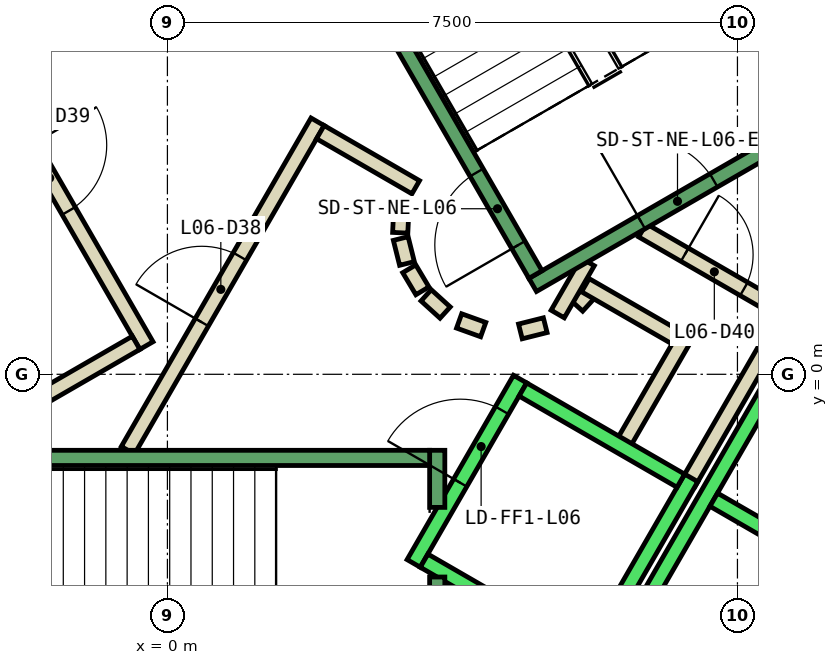
"""IFC4 building model, lengths in metres.
Left out: names, types, materials, properties, quantities, classifications, styles, units other than length and angle.
Written with IfcOpenShell. Run it as: python <this file> out.ifc"""

import sys

from ifc_helpers import new_model, si_unit, direction, frame, frame_2d, origin, place, context, subcontext, project, spatial, polyline, rectangle, outline, extrude, element, fill, save


model = new_model("IFC4")
c1 = context("Model", 3, precision=1e-05, world=origin(), true_north=direction((0.0, 1.0)))
c2 = subcontext(c1, "Body", "Model", "MODEL_VIEW")
j1 = project(units=[si_unit("LENGTHUNIT", "METRE"), si_unit("PLANEANGLEUNIT", "RADIAN")], contexts=[c1])
p1 = place(None, origin())
s1 = spatial("IfcSite", under=j1, at=p1, CompositionType="ELEMENT")
p2 = place(p1, origin())
s2 = spatial("IfcBuilding", under=s1, at=p2, CompositionType="ELEMENT")
p3 = place(p2, frame((0.0, 0.0, 35.0)))
s3 = spatial("IfcBuildingStorey", under=s2, at=p3, CompositionType="ELEMENT", Elevation=35.0)
p4 = place(p3, frame((0.0, 0.0, -0.6)))
e1 = element("IfcWall", 1, at=p4, inside=s3, PredefinedType="SHEAR", context=c2, shape_type="SweptSolid", body=[
    extrude(outline(polyline([(8.517, 11.748), (7.651, 11.248), (12.702, 2.5), (13.856, 2.5), (8.517, 11.748)])), origin(), (0.0, 0.0, 1.0), 4.4),
])
p5 = place(p3, frame((5.39, 0.898, 0.0), z_axis=(0.0, 0.0, 1.0), x_axis=(0.673828488714, 0.738887791073, 0.0)))
e2 = element("IfcWall", 2, at=p5, inside=s3, PredefinedType="PARTITIONING", context=c2, shape_type="SweptSolid", body=[
    extrude(rectangle(XDim=0.263, YDim=0.2, at=frame_2d((0.131, 0.0))), origin(), (0.0, 0.0, 1.0), 3.8),
])
p6 = place(p3, frame((5.499, 1.172, 0.0), z_axis=(0.0, 0.0, 1.0), x_axis=(0.866333505267, -0.499465972466, 0.0)))
e3 = element("IfcWall", 3, at=p6, inside=s3, PredefinedType="PARTITIONING", context=c2, shape_type="SweptSolid", body=[
    extrude(rectangle(XDim=1.374, YDim=0.2, at=frame_2d((0.687, 0.0))), origin(), (0.0, 0.0, 1.0), 3.8),
])
p7 = place(p3, frame((6.826, 0.522, 0.0), z_axis=(0.0, 0.0, 1.0), x_axis=(-0.500016722714, -0.866015748706, 0.0)))
e4 = element("IfcWall", 4, at=p7, inside=s3, PredefinedType="PARTITIONING", context=c2, shape_type="SweptSolid", body=[
    extrude(rectangle(XDim=1.7, YDim=0.2, at=frame_2d((0.85, 0.0))), origin(), (0.0, 0.0, 1.0), 3.8),
])
p8 = place(p3, frame((6.25, 1.894, 0.0), z_axis=(0.0, 0.0, 1.0), x_axis=(0.866043184279, -0.499969202016, 0.0)))
e5 = element("IfcWall", 5, at=p8, inside=s3, PredefinedType="PARTITIONING", context=c2, shape_type="SweptSolid", body=[
    extrude(rectangle(XDim=2.084, YDim=0.2, at=frame_2d((1.042, 0.0))), origin(), (0.0, 0.0, 1.0), 3.8),
])
p9 = place(p8, frame((0.642, 0.0, 0.0)))
e6 = element("IfcOpeningElement", 6, at=p9, cuts=e5, PredefinedType="OPENING", context=c2, shape_type="SweptSolid", body=[
    extrude(rectangle(XDim=0.9, YDim=2.1, at=frame_2d((0.45, 1.05))), frame((0.0, 0.11, 0.0), z_axis=(0.0, -1.0, 0.0), x_axis=(1.0, 0.0, 0.0)), (0.0, 0.0, 1.0), 0.22),
])
p10 = place(p3, frame((8.192, 0.888, 0.0), z_axis=(0.0, 0.0, 1.0), x_axis=(-0.499940625693, -0.866059680843, 0.0)))
e7 = element("IfcWall", 7, at=p10, inside=s3, PredefinedType="PARTITIONING", context=c2, shape_type="SweptSolid", body=[
    extrude(rectangle(XDim=2.68, YDim=0.2, at=frame_2d((1.34, 0.0))), origin(), (0.0, 0.0, 1.0), 3.8),
])
p11 = place(p3, frame((5.135, 0.793, 0.0), z_axis=(0.0, 0.0, 1.0), x_axis=(0.499526442893, 0.866298639529, 0.0)))
e8 = element("IfcWall", 8, at=p11, inside=s3, PredefinedType="PARTITIONING", context=c2, shape_type="SweptSolid", body=[
    extrude(rectangle(XDim=0.791, YDim=0.2, at=frame_2d((0.396, 0.0))), origin(), (0.0, 0.0, 1.0), 3.8),
])
p12 = place(p3, frame((-0.52, -1.0, 0.0), z_axis=(0.0, 0.0, 1.0), x_axis=(0.50011622646, 0.865958290007, 0.0)))
e9 = element("IfcWall", 9, at=p12, inside=s3, PredefinedType="PARTITIONING", context=c2, shape_type="SweptSolid", body=[
    extrude(rectangle(XDim=4.991, YDim=0.2, at=frame_2d((2.496, 0.0))), origin(), (0.0, 0.0, 1.0), 3.8),
])
p13 = place(p12, frame((1.945, 0.0, 0.0)))
e10 = element("IfcOpeningElement", 10, at=p13, cuts=e9, PredefinedType="OPENING", context=c2, shape_type="SweptSolid", body=[
    extrude(rectangle(XDim=1.0, YDim=2.1, at=frame_2d((0.5, 1.05))), frame((0.0, 0.11, 0.0), z_axis=(0.0, -1.0, 0.0), x_axis=(1.0, 0.0, 0.0)), (0.0, 0.0, 1.0), 0.22),
])
p14 = place(p3, frame((2.012, 3.186, 0.0), z_axis=(0.0, 0.0, 1.0), x_axis=(0.865891012941, -0.500232699559, 0.0)))
e11 = element("IfcWall", 11, at=p14, inside=s3, PredefinedType="PARTITIONING", context=c2, shape_type="SweptSolid", body=[
    extrude(rectangle(XDim=1.449, YDim=0.2, at=frame_2d((0.725, 0.0))), origin(), (0.0, 0.0, 1.0), 3.8),
])
p15 = place(p3, frame((3.079, 2.199, 0.0), z_axis=(0.0, 0.0, 1.0), x_axis=(-0.047771483479, -0.998858290933, 0.0)))
e12 = element("IfcWall", 12, at=p15, inside=s3, PredefinedType="PARTITIONING", context=c2, shape_type="SweptSolid", body=[
    extrude(rectangle(XDim=0.337, YDim=0.2, at=frame_2d((0.169, 0.0))), origin(), (0.0, 0.0, 1.0), 3.8),
])
p16 = place(p3, frame((3.07, 1.786, 0.0), z_axis=(0.0, 0.0, 1.0), x_axis=(0.242705583207, -0.970099994784, 0.0)))
e13 = element("IfcWall", 13, at=p16, inside=s3, PredefinedType="PARTITIONING", context=c2, shape_type="SweptSolid", body=[
    extrude(rectangle(XDim=0.338, YDim=0.2, at=frame_2d((0.169, 0.0))), origin(), (0.0, 0.0, 1.0), 3.8),
])
for number, where, z_axis, x_axis in (
    (14, (3.182, 1.388, 0.0), (0.0, 0.0, 1.0), (0.512, -0.859, 0.0)),
    (15, (3.404, 1.039, 0.0), (0.0, 0.0, 1.0), (0.74, -0.672, 0.0)),
):
    element("IfcWall", number, at=place(p3, frame(where, z_axis=z_axis, x_axis=x_axis)), inside=s3, PredefinedType="PARTITIONING", context=c2, shape_type="SweptSolid", body=[
        extrude(rectangle(XDim=0.338, YDim=0.2, at=frame_2d((0.169, 0.0))), origin(), (0.0, 0.0, 1.0), 3.8),
    ])
p17 = place(p3, frame((3.838, 0.702, 0.0), z_axis=(0.0, 0.0, 1.0), x_axis=(0.941035081519, -0.338308993895, 0.0)))
e16 = element("IfcWall", 16, at=p17, inside=s3, PredefinedType="PARTITIONING", context=c2, shape_type="SweptSolid", body=[
    extrude(rectangle(XDim=0.337, YDim=0.2, at=frame_2d((0.168, 0.0))), origin(), (0.0, 0.0, 1.0), 3.8),
])
p18 = place(p3, frame((4.644, 0.564, 0.0), z_axis=(0.0, 0.0, 1.0), x_axis=(0.969929076366, 0.243387729394, 0.0)))
e17 = element("IfcWall", 17, at=p18, inside=s3, PredefinedType="PARTITIONING", context=c2, shape_type="SweptSolid", body=[
    extrude(rectangle(XDim=0.337, YDim=0.2, at=frame_2d((0.168, 0.0))), origin(), (0.0, 0.0, 1.0), 3.8),
])
p19 = place(p3, frame((-2.771, 4.7, 0.0), z_axis=(0.0, 0.0, 1.0), x_axis=(0.499969479948, -0.866043023828, 0.0)))
e18 = element("IfcWall", 18, at=p19, inside=s3, PredefinedType="PARTITIONING", context=c2, shape_type="SweptSolid", body=[
    extrude(rectangle(XDim=4.99, YDim=0.2, at=frame_2d((2.495, 0.0))), origin(), (0.0, 0.0, 1.0), 3.8),
])
p20 = place(p19, frame((1.945, 0.0, 0.0)))
e19 = element("IfcOpeningElement", 19, at=p20, cuts=e18, PredefinedType="OPENING", context=c2, shape_type="SweptSolid", body=[
    extrude(rectangle(XDim=1.0, YDim=2.1, at=frame_2d((0.5, 1.05))), frame((0.0, 0.11, 0.0), z_axis=(0.0, -1.0, 0.0), x_axis=(1.0, 0.0, 0.0)), (0.0, 0.0, 1.0), 0.22),
])
p21 = place(p3, frame((-0.412, 0.414, 0.0), z_axis=(0.0, 0.0, 1.0), x_axis=(-0.866017369001, -0.500013916395, 0.0)))
e20 = element("IfcWall", 20, at=p21, inside=s3, PredefinedType="PARTITIONING", context=c2, shape_type="SweptSolid", body=[
    extrude(rectangle(XDim=1.45, YDim=0.2, at=frame_2d((0.725, 0.0))), origin(), (0.0, 0.0, 1.0), 3.8),
])
p22 = place(p3, frame((3.24, -2.488, 0.0), z_axis=(0.0, 0.0, 1.0), x_axis=(0.49994636267, 0.866056369097, 0.0)))
e21 = element("IfcWall", 21, at=p22, inside=s3, PredefinedType="STANDARD", context=c2, shape_type="SweptSolid", body=[
    extrude(rectangle(XDim=2.8, YDim=0.2, at=frame_2d((1.4, 0.0))), origin(), (0.0, 0.0, 1.0), 3.8),
])
p23 = place(p22, frame((1.225, 0.0, 0.0)))
e22 = element("IfcOpeningElement", 22, at=p23, cuts=e21, PredefinedType="OPENING", context=c2, shape_type="SweptSolid", body=[
    extrude(rectangle(XDim=1.1, YDim=2.1, at=frame_2d((0.55, 1.05))), frame((0.0, 0.11, 0.0), z_axis=(0.0, -1.0, 0.0), x_axis=(1.0, 0.0, 0.0)), (0.0, 0.0, 1.0), 0.22),
])
p24 = place(p3, frame((5.492, -3.788, 0.0), z_axis=(0.0, 0.0, 1.0), x_axis=(0.500011755427, 0.866018616679, 0.0)))
e23 = element("IfcWall", 23, at=p24, inside=s3, PredefinedType="STANDARD", context=c2, shape_type="SweptSolid", body=[
    extrude(rectangle(XDim=2.8, YDim=0.2, at=frame_2d((1.4, 0.0))), origin(), (0.0, 0.0, 1.0), 3.8),
])
p25 = place(p3, frame((3.377, -2.452, 0.0), z_axis=(0.0, 0.0, 1.0), x_axis=(0.865955154139, -0.50012165622, 0.0)))
e24 = element("IfcWall", 24, at=p25, inside=s3, PredefinedType="STANDARD", context=c2, shape_type="SweptSolid", body=[
    extrude(rectangle(XDim=2.4, YDim=0.2, at=frame_2d((1.2, 0.0))), origin(), (0.0, 0.0, 1.0), 3.8),
])
p26 = place(p3, frame((4.677, -0.2, 0.0), z_axis=(0.0, 0.0, 1.0), x_axis=(0.865973769406, -0.500089422704, 0.0)))
e25 = element("IfcWall", 25, at=p26, inside=s3, PredefinedType="STANDARD", context=c2, shape_type="SweptSolid", body=[
    extrude(rectangle(XDim=2.399, YDim=0.2, at=frame_2d((1.2, 0.0))), origin(), (0.0, 0.0, 1.0), 3.8),
])
p27 = place(p3, frame((4.451, -6.19, 0.0), z_axis=(0.0, 0.0, 1.0), x_axis=(0.50000090737, 0.866024879913, 0.0)))
e26 = element("IfcWall", 26, at=p27, inside=s3, PredefinedType="STANDARD", context=c2, shape_type="SweptSolid", body=[
    extrude(rectangle(XDim=10.6, YDim=0.2, at=frame_2d((5.3, 0.0))), origin(), (0.0, 0.0, 1.0), 3.8),
])
p28 = place(p3, frame((7.188, -1.65, 0.0), z_axis=(0.0, 0.0, 1.0), x_axis=(0.866022959057, -0.500004234368, 0.0)))
e27 = element("IfcWall", 27, at=p28, inside=s3, PredefinedType="STANDARD", context=c2, shape_type="SweptSolid", body=[
    extrude(rectangle(XDim=2.5, YDim=0.2, at=frame_2d((1.25, 0.0))), origin(), (0.0, 0.0, 1.0), 3.8),
])
p29 = place(p3, frame((3.55, -2.667, 0.0), z_axis=(0.0, 0.0, 1.0), x_axis=(0.0, -1.0, 0.0)))
e28 = element("IfcWall", 28, at=p29, inside=s3, PredefinedType="STANDARD", context=c2, shape_type="SweptSolid", body=[
    extrude(rectangle(XDim=2.733, YDim=0.2, at=frame_2d((1.366, 0.0))), origin(), (0.0, 0.0, 1.0), 3.8),
])
p30 = place(p3, frame((3.55, -1.0, 0.0), z_axis=(0.0, 0.0, 1.0), x_axis=(0.0, -1.0, 0.0)))
e29 = element("IfcWall", 29, at=p30, inside=s3, PredefinedType="STANDARD", context=c2, shape_type="SweptSolid", body=[
    extrude(rectangle(XDim=0.751, YDim=0.2, at=frame_2d((0.375, 0.0))), origin(), (0.0, 0.0, 1.0), 3.8),
])
p31 = place(p3, frame((-3.45, -1.1, 0.0), z_axis=(0.0, 0.0, 1.0), x_axis=(1.0, 0.0, 0.0)))
e30 = element("IfcWall", 30, at=p31, inside=s3, PredefinedType="STANDARD", context=c2, shape_type="SweptSolid", body=[
    extrude(rectangle(XDim=6.9, YDim=0.2, at=frame_2d((3.45, 0.0))), origin(), (0.0, 0.0, 1.0), 3.8),
])
p32 = place(p31, frame((0.45, 0.0, 0.0)))
e31 = element("IfcOpeningElement", 31, at=p32, cuts=e30, PredefinedType="OPENING", context=c2, shape_type="SweptSolid", body=[
    extrude(rectangle(XDim=1.1, YDim=2.2, at=frame_2d((0.55, 1.1))), frame((0.0, 0.11, 0.0), z_axis=(0.0, -1.0, 0.0), x_axis=(1.0, 0.0, 0.0)), (0.0, 0.0, 1.0), 0.22),
])
p33 = place(p3, frame((4.806, 1.176, 0.0), z_axis=(0.0, 0.0, 1.0), x_axis=(0.866059941101, 0.499940174841, 0.0)))
e32 = element("IfcWall", 32, at=p33, inside=s3, PredefinedType="STANDARD", context=c2, shape_type="SweptSolid", body=[
    extrude(rectangle(XDim=4.4, YDim=0.2, at=frame_2d((2.2, 0.0))), origin(), (0.0, 0.0, 1.0), 3.8),
])
p34 = place(p33, frame((1.65, 0.0, 0.0)))
e33 = element("IfcOpeningElement", 33, at=p34, cuts=e32, PredefinedType="OPENING", context=c2, shape_type="SweptSolid", body=[
    extrude(rectangle(XDim=1.1, YDim=2.2, at=frame_2d((0.55, 1.1))), frame((0.0, 0.11, 0.0), z_axis=(0.0, -1.0, 0.0), x_axis=(1.0, 0.0, 0.0)), (0.0, 0.0, 1.0), 0.22),
])
p35 = place(p3, frame((4.843, 1.312, 0.0), z_axis=(0.0, 0.0, 1.0), x_axis=(-0.499963383562, 0.866046543262, 0.0)))
e34 = element("IfcWall", 34, at=p35, inside=s3, PredefinedType="STANDARD", context=c2, shape_type="SweptSolid", body=[
    extrude(rectangle(XDim=6.9, YDim=0.2, at=frame_2d((3.45, 0.0))), origin(), (0.0, 0.0, 1.0), 3.8),
])
p36 = place(p35, frame((0.45, 0.0, 0.0)))
e35 = element("IfcOpeningElement", 35, at=p36, cuts=e34, PredefinedType="OPENING", context=c2, shape_type="SweptSolid", body=[
    extrude(rectangle(XDim=1.1, YDim=2.2, at=frame_2d((0.55, 1.1))), frame((0.0, 0.11, 0.0), z_axis=(0.0, -1.0, 0.0), x_axis=(1.0, 0.0, 0.0)), (0.0, 0.0, 1.0), 0.22),
])
p37 = place(p3, frame((8.48, 3.412, 0.0), z_axis=(0.0, 0.0, 1.0), x_axis=(-0.499978703459, 0.866037698999, 0.0)))
e36 = element("IfcWall", 36, at=p37, inside=s3, PredefinedType="STANDARD", context=c2, shape_type="SweptSolid", body=[
    extrude(rectangle(XDim=6.9, YDim=0.2, at=frame_2d((3.45, 0.0))), origin(), (0.0, 0.0, 1.0), 3.8),
])
p38 = place(p3, frame((-1.393, 7.288, 0.0), z_axis=(0.0, 0.0, 1.0), x_axis=(-0.499963383562, -0.866046543262, 0.0)))
e37 = element("IfcWall", 37, at=p38, inside=s3, PredefinedType="STANDARD", context=c2, shape_type="SweptSolid", body=[
    extrude(rectangle(XDim=6.9, YDim=0.2, at=frame_2d((3.45, 0.0))), origin(), (0.0, 0.0, 1.0), 3.8),
])
p39 = place(p38, frame((0.45, 0.0, 0.0)))
e38 = element("IfcOpeningElement", 38, at=p39, cuts=e37, PredefinedType="OPENING", context=c2, shape_type="SweptSolid", body=[
    extrude(rectangle(XDim=1.1, YDim=2.2, at=frame_2d((0.55, 1.1))), frame((0.0, 0.11, 0.0), z_axis=(0.0, -1.0, 0.0), x_axis=(1.0, 0.0, 0.0)), (0.0, 0.0, 1.0), 0.22),
])
p40 = place(p13, origin())
e39 = element("IfcDoor", 39, at=p40, inside=s3, OperationType="SINGLE_SWING_LEFT", PredefinedType="DOOR", context=c2, shape_type="SweptSolid", body=[
    extrude(rectangle(XDim=1.0, YDim=2.1, at=frame_2d((0.5, 1.05))), frame((0.0, 0.025, 0.0), z_axis=(0.0, -1.0, 0.0), x_axis=(1.0, 0.0, 0.0)), (0.0, 0.0, 1.0), 0.05),
])
fill(e10, e39)
p41 = place(p20, origin())
e40 = element("IfcDoor", 40, at=p41, inside=s3, OperationType="SINGLE_SWING_RIGHT", PredefinedType="DOOR", context=c2, shape_type="SweptSolid", body=[
    extrude(rectangle(XDim=1.0, YDim=2.1, at=frame_2d((0.5, 1.05))), frame((0.0, 0.025, 0.0), z_axis=(0.0, -1.0, 0.0), x_axis=(1.0, 0.0, 0.0)), (0.0, 0.0, 1.0), 0.05),
])
fill(e19, e40)
p42 = place(p9, origin())
e41 = element("IfcDoor", 41, at=p42, inside=s3, OperationType="SINGLE_SWING_LEFT", PredefinedType="DOOR", context=c2, shape_type="SweptSolid", body=[
    extrude(rectangle(XDim=0.9, YDim=2.1, at=frame_2d((0.45, 1.05))), frame((0.0, 0.025, 0.0), z_axis=(0.0, -1.0, 0.0), x_axis=(1.0, 0.0, 0.0)), (0.0, 0.0, 1.0), 0.05),
])
fill(e6, e41)
p43 = place(p23, origin())
e42 = element("IfcDoor", 42, at=p43, inside=s3, OperationType="SLIDING_TO_LEFT", PredefinedType="DOOR", context=c2, shape_type="SweptSolid", body=[
    extrude(rectangle(XDim=1.1, YDim=2.1, at=frame_2d((0.55, 1.05))), frame((0.0, 0.025, 0.0), z_axis=(0.0, -1.0, 0.0), x_axis=(1.0, 0.0, 0.0)), (0.0, 0.0, 1.0), 0.05),
])
fill(e22, e42)
p44 = place(p36, origin())
e43 = element("IfcDoor", 43, at=p44, inside=s3, OperationType="SINGLE_SWING_LEFT", PredefinedType="DOOR", context=c2, shape_type="SweptSolid", body=[
    extrude(rectangle(XDim=1.1, YDim=2.2, at=frame_2d((0.55, 1.1))), frame((0.0, 0.025, 0.0), z_axis=(0.0, -1.0, 0.0), x_axis=(1.0, 0.0, 0.0)), (0.0, 0.0, 1.0), 0.05),
])
fill(e35, e43)
p45 = place(p34, origin())
e44 = element("IfcDoor", 44, at=p45, inside=s3, OperationType="SINGLE_SWING_LEFT", PredefinedType="DOOR", context=c2, shape_type="SweptSolid", body=[
    extrude(rectangle(XDim=1.1, YDim=2.2, at=frame_2d((0.55, 1.1))), frame((0.0, 0.025, 0.0), z_axis=(0.0, -1.0, 0.0), x_axis=(1.0, 0.0, 0.0)), (0.0, 0.0, 1.0), 0.05),
])
fill(e33, e44)
save(model, sys.argv[1])
